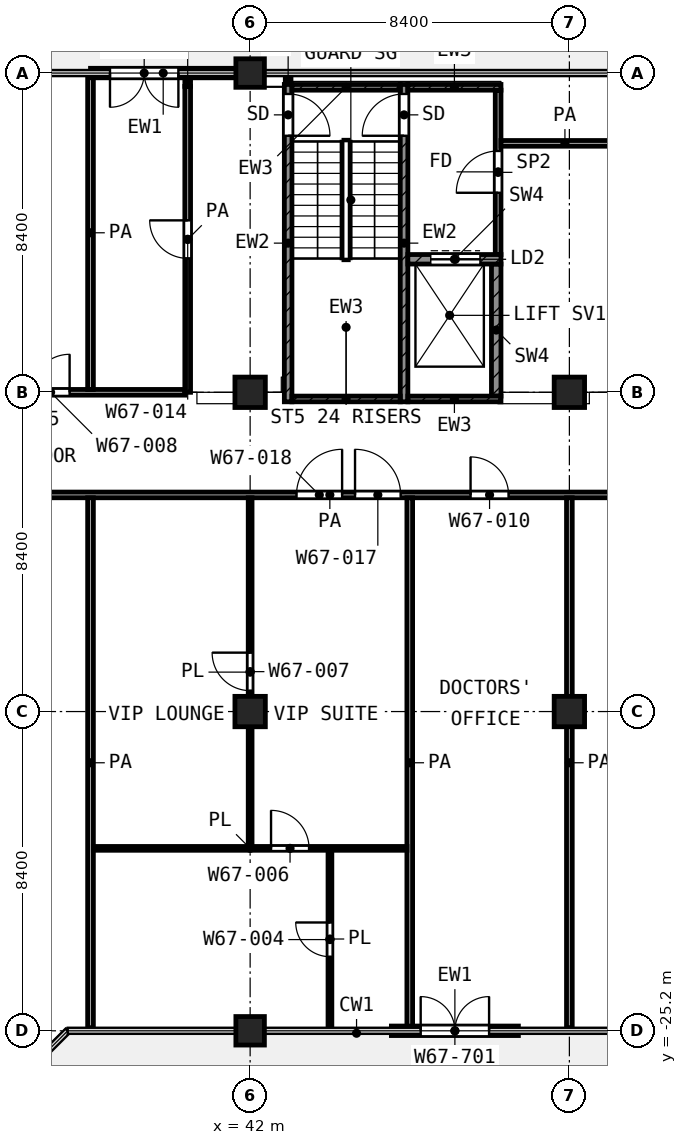
"""IFC4 building model, lengths in metres.
Left out: names, types, materials, properties, quantities, classifications, styles, units other than length and angle.
Written with IfcOpenShell. Run it as: python <this file> out.ifc"""

import sys

from ifc_helpers import new_model, si_unit, direction, frame, frame_2d, origin, origin_2d, place, context, subcontext, project, spatial, rectangle, extrude, element, fill, save


model = new_model("IFC4")
c1 = context("Model", 3, precision=1e-05, world=origin(), true_north=direction((0.0, 1.0)))
c2 = subcontext(c1, "Body", "Model", "MODEL_VIEW")
j1 = project(units=[si_unit("LENGTHUNIT", "METRE"), si_unit("PLANEANGLEUNIT", "RADIAN")], contexts=[c1])
p1 = place(None, origin())
s1 = spatial("IfcSite", under=j1, at=p1, CompositionType="ELEMENT")
p2 = place(p1, origin())
s2 = spatial("IfcBuilding", under=s1, at=p2, CompositionType="ELEMENT")
p3 = place(p2, frame((0.0, 0.0, 290.2)))
s3 = spatial("IfcBuildingStorey", under=s2, at=p3, CompositionType="ELEMENT", Elevation=290.2)
p4 = place(p3, frame((42.0, 0.0, 0.0), z_axis=(0.0, 0.0, 1.0), x_axis=(1.0, 0.0, 0.0)))
e1 = element("IfcColumn", 1, at=p4, inside=s3, PredefinedType="COLUMN", context=c2, shape_type="SweptSolid", body=[
    extrude(rectangle(XDim=0.75, YDim=0.75, at=origin_2d()), origin(), (0.0, 0.0, 1.0), 4.2),
])
for number, where, z_axis, x_axis in (
    (2, (42.0, -8.4, 0.0), (0.0, 0.0, 1.0), (1.0, 0.0, 0.0)),
    (3, (50.4, -8.4, 0.0), (0.0, 0.0, 1.0), (1.0, 0.0, 0.0)),
    (4, (42.0, -16.8, 0.0), (0.0, 0.0, 1.0), (1.0, 0.0, 0.0)),
    (5, (50.4, -16.8, 0.0), (0.0, 0.0, 1.0), (1.0, 0.0, 0.0)),
):
    element("IfcColumn", number, at=place(p3, frame(where, z_axis=z_axis, x_axis=x_axis)), inside=s3, PredefinedType="COLUMN", context=c2, shape_type="SweptSolid", body=[
        extrude(rectangle(XDim=0.8, YDim=0.8, at=origin_2d()), origin(), (0.0, 0.0, 1.0), 4.2),
    ])
p5 = place(p3, frame((42.0, -25.2, 0.0), z_axis=(0.0, 0.0, 1.0), x_axis=(1.0, 0.0, 0.0)))
e6 = element("IfcColumn", 6, at=p5, inside=s3, PredefinedType="COLUMN", context=c2, shape_type="SweptSolid", body=[
    extrude(rectangle(XDim=0.75, YDim=0.75, at=origin_2d()), origin(), (0.0, 0.0, 1.0), 4.2),
])
p6 = place(p3, frame((45.717, -25.2, 0.0), z_axis=(0.0, 0.0, 1.0), x_axis=(1.0, 0.0, 0.0)))
e7 = element("IfcWall", 7, at=p6, inside=s3, PredefinedType="SOLIDWALL", context=c2, shape_type="SweptSolid", body=[
    extrude(rectangle(XDim=3.342, YDim=0.25, at=frame_2d((1.671, 0.0))), origin(), (0.0, 0.0, 1.0), 3.48),
])
p7 = place(p6, frame((0.771, 0.0, 0.0)))
e8 = element("IfcOpeningElement", 8, at=p7, cuts=e7, PredefinedType="OPENING", context=c2, shape_type="SweptSolid", body=[
    extrude(rectangle(XDim=1.8, YDim=2.1, at=frame_2d((0.9, 1.05))), frame((0.0, 0.135, 0.0), z_axis=(0.0, -1.0, 0.0), x_axis=(1.0, 0.0, 0.0)), (0.0, 0.0, 1.0), 0.27),
])
p8 = place(p3, frame((41.625, 0.0, 0.0), z_axis=(0.0, 0.0, 1.0), x_axis=(-1.0, 0.0, 0.0)))
e9 = element("IfcWall", 9, at=p8, inside=s3, PredefinedType="SOLIDWALL", context=c2, shape_type="SweptSolid", body=[
    extrude(rectangle(XDim=3.825, YDim=0.25, at=frame_2d((1.913, 0.0))), origin(), (0.0, 0.0, 1.0), 3.48),
])
p9 = place(p8, frame((1.512, 0.0, 0.0)))
e10 = element("IfcOpeningElement", 10, at=p9, cuts=e9, PredefinedType="OPENING", context=c2, shape_type="SweptSolid", body=[
    extrude(rectangle(XDim=1.8, YDim=2.1, at=frame_2d((0.9, 1.05))), frame((0.0, 0.135, 0.0), z_axis=(0.0, -1.0, 0.0), x_axis=(1.0, 0.0, 0.0)), (0.0, 0.0, 1.0), 0.27),
])
p10 = place(p3, frame((43.0, -8.65, 0.0), z_axis=(0.0, 0.0, 1.0), x_axis=(0.0, 1.0, 0.0)))
e11 = element("IfcWall", 11, at=p10, inside=s3, PredefinedType="SHEAR", context=c2, shape_type="SweptSolid", body=[
    extrude(rectangle(XDim=8.35, YDim=0.2, at=frame_2d((4.175, 0.0))), origin(), (0.0, 0.0, 1.0), 3.6),
])
p11 = place(p10, frame((7.0, 0.0, 0.0)))
e12 = element("IfcOpeningElement", 12, at=p11, cuts=e11, PredefinedType="OPENING", context=c2, shape_type="SweptSolid", body=[
    extrude(rectangle(XDim=1.1, YDim=2.1, at=frame_2d((0.55, 1.05))), frame((0.0, 0.11, 0.0), z_axis=(0.0, -1.0, 0.0), x_axis=(1.0, 0.0, 0.0)), (0.0, 0.0, 1.0), 0.22),
])
p12 = place(p3, frame((46.05, -8.65, 0.0), z_axis=(0.0, 0.0, 1.0), x_axis=(0.0, 1.0, 0.0)))
e13 = element("IfcWall", 13, at=p12, inside=s3, PredefinedType="SHEAR", context=c2, shape_type="SweptSolid", body=[
    extrude(rectangle(XDim=8.35, YDim=0.2, at=frame_2d((4.175, 0.0))), origin(), (0.0, 0.0, 1.0), 3.6),
])
p13 = place(p12, frame((7.0, 0.0, 0.0)))
e14 = element("IfcOpeningElement", 14, at=p13, cuts=e13, PredefinedType="OPENING", context=c2, shape_type="SweptSolid", body=[
    extrude(rectangle(XDim=1.1, YDim=2.1, at=frame_2d((0.55, 1.05))), frame((0.0, 0.11, 0.0), z_axis=(0.0, -1.0, 0.0), x_axis=(1.0, 0.0, 0.0)), (0.0, 0.0, 1.0), 0.22),
])
p14 = place(p3, frame((43.1, -0.375, 0.0), z_axis=(0.0, 0.0, 1.0), x_axis=(1.0, 0.0, 0.0)))
e15 = element("IfcWall", 15, at=p14, inside=s3, PredefinedType="SHEAR", context=c2, shape_type="SweptSolid", body=[
    extrude(rectangle(XDim=2.85, YDim=0.15, at=frame_2d((1.425, 0.0))), origin(), (0.0, 0.0, 1.0), 3.6),
])
p15 = place(p3, frame((46.15, -0.375, 0.0), z_axis=(0.0, 0.0, 1.0), x_axis=(1.0, 0.0, 0.0)))
e16 = element("IfcWall", 16, at=p15, inside=s3, PredefinedType="SHEAR", context=c2, shape_type="SweptSolid", body=[
    extrude(rectangle(XDim=2.45, YDim=0.15, at=frame_2d((1.225, 0.0))), origin(), (0.0, 0.0, 1.0), 3.6),
])
p16 = place(p3, frame((43.1, -8.575, 0.0), z_axis=(0.0, 0.0, 1.0), x_axis=(1.0, 0.0, 0.0)))
e17 = element("IfcWall", 17, at=p16, inside=s3, PredefinedType="SHEAR", context=c2, shape_type="SweptSolid", body=[
    extrude(rectangle(XDim=2.85, YDim=0.15, at=frame_2d((1.425, 0.0))), origin(), (0.0, 0.0, 1.0), 3.6),
])
p17 = place(p3, frame((46.15, -8.575, 0.0), z_axis=(0.0, 0.0, 1.0), x_axis=(1.0, 0.0, 0.0)))
e18 = element("IfcWall", 18, at=p17, inside=s3, PredefinedType="SHEAR", context=c2, shape_type="SweptSolid", body=[
    extrude(rectangle(XDim=2.45, YDim=0.15, at=frame_2d((1.225, 0.0))), origin(), (0.0, 0.0, 1.0), 3.6),
])
p18 = place(p3, frame((46.15, -4.9, 0.0), z_axis=(0.0, 0.0, 1.0), x_axis=(1.0, 0.0, 0.0)))
e19 = element("IfcWall", 19, at=p18, inside=s3, PredefinedType="SHEAR", context=c2, shape_type="SweptSolid", body=[
    extrude(rectangle(XDim=2.45, YDim=0.25, at=frame_2d((1.225, 0.0))), origin(), (0.0, 0.0, 1.0), 3.6),
])
p19 = place(p18, frame((0.6, 0.0, 0.0)))
e20 = element("IfcOpeningElement", 20, at=p19, cuts=e19, PredefinedType="OPENING", context=c2, shape_type="SweptSolid", body=[
    extrude(rectangle(XDim=1.3, YDim=2.1, at=frame_2d((0.65, 1.05))), frame((0.0, 0.135, 0.0), z_axis=(0.0, -1.0, 0.0), x_axis=(1.0, 0.0, 0.0)), (0.0, 0.0, 1.0), 0.27),
])
p20 = place(p3, frame((48.475, -8.5, 0.0), z_axis=(0.0, 0.0, 1.0), x_axis=(0.0, 1.0, 0.0)))
e21 = element("IfcWall", 21, at=p20, inside=s3, PredefinedType="SHEAR", context=c2, shape_type="SweptSolid", body=[
    extrude(rectangle(XDim=3.475, YDim=0.25, at=frame_2d((1.738, 0.0))), origin(), (0.0, 0.0, 1.0), 3.6),
])
p21 = place(p3, frame((48.525, -4.775, 0.0), z_axis=(0.0, 0.0, 1.0), x_axis=(0.0, 1.0, 0.0)))
e22 = element("IfcWall", 22, at=p21, inside=s3, PredefinedType="PARTITIONING", context=c2, shape_type="SweptSolid", body=[
    extrude(rectangle(XDim=4.325, YDim=0.15, at=frame_2d((2.163, 0.0))), origin(), (0.0, 0.0, 1.0), 3.6),
])
p22 = place(p21, frame((1.625, 0.0, 0.0)))
e23 = element("IfcOpeningElement", 23, at=p22, cuts=e22, PredefinedType="OPENING", context=c2, shape_type="SweptSolid", body=[
    extrude(rectangle(XDim=1.1, YDim=2.1, at=frame_2d((0.55, 1.05))), frame((0.0, 0.085, 0.0), z_axis=(0.0, -1.0, 0.0), x_axis=(1.0, 0.0, 0.0)), (0.0, 0.0, 1.0), 0.17),
])
p23 = place(p3, frame((37.875, -20.4, 0.0), z_axis=(0.0, 0.0, 1.0), x_axis=(1.0, 0.0, 0.0)))
e24 = element("IfcWall", 24, at=p23, inside=s3, PredefinedType="PARTITIONING", context=c2, shape_type="SweptSolid", body=[
    extrude(rectangle(XDim=8.25, YDim=0.1, at=frame_2d((4.125, 0.0))), origin(), (0.0, 0.0, 1.0), 3.6),
])
p24 = place(p23, frame((4.675, 0.0, 0.0)))
e25 = element("IfcOpeningElement", 25, at=p24, cuts=e24, PredefinedType="OPENING", context=c2, shape_type="SweptSolid", body=[
    extrude(rectangle(XDim=1.0, YDim=2.1, at=frame_2d((0.5, 1.05))), frame((0.0, 0.06, 0.0), z_axis=(0.0, -1.0, 0.0), x_axis=(1.0, 0.0, 0.0)), (0.0, 0.0, 1.0), 0.12),
])
p25 = place(p3, frame((42.0, -20.35, 0.0), z_axis=(0.0, 0.0, 1.0), x_axis=(0.0, 1.0, 0.0)))
e26 = element("IfcWall", 26, at=p25, inside=s3, PredefinedType="PARTITIONING", context=c2, shape_type="SweptSolid", body=[
    extrude(rectangle(XDim=9.175, YDim=0.1, at=frame_2d((4.587, 0.0))), origin(), (0.0, 0.0, 1.0), 3.6),
])
p26 = place(p25, frame((4.1, 0.0, 0.0)))
e27 = element("IfcOpeningElement", 27, at=p26, cuts=e26, PredefinedType="OPENING", context=c2, shape_type="SweptSolid", body=[
    extrude(rectangle(XDim=1.0, YDim=2.1, at=frame_2d((0.5, 1.05))), frame((0.0, 0.06, 0.0), z_axis=(0.0, -1.0, 0.0), x_axis=(1.0, 0.0, 0.0)), (0.0, 0.0, 1.0), 0.12),
])
p27 = place(p3, frame((44.1, -25.12, 0.0), z_axis=(0.0, 0.0, 1.0), x_axis=(0.0, 1.0, 0.0)))
e28 = element("IfcWall", 28, at=p27, inside=s3, PredefinedType="PARTITIONING", context=c2, shape_type="SweptSolid", body=[
    extrude(rectangle(XDim=4.67, YDim=0.1, at=frame_2d((2.335, 0.0))), origin(), (0.0, 0.0, 1.0), 3.6),
])
p28 = place(p27, frame((1.87, 0.0, 0.0)))
e29 = element("IfcOpeningElement", 29, at=p28, cuts=e28, PredefinedType="OPENING", context=c2, shape_type="SweptSolid", body=[
    extrude(rectangle(XDim=0.9, YDim=2.1, at=frame_2d((0.45, 1.05))), frame((0.0, 0.06, 0.0), z_axis=(0.0, -1.0, 0.0), x_axis=(1.0, 0.0, 0.0)), (0.0, 0.0, 1.0), 0.12),
])
p29 = place(p3, frame((29.475, -11.1, 0.0), z_axis=(0.0, 0.0, 1.0), x_axis=(1.0, 0.0, 0.0)))
e30 = element("IfcWall", 30, at=p29, inside=s3, PredefinedType="PARTITIONING", context=c2, shape_type="SweptSolid", body=[
    extrude(rectangle(XDim=29.245, YDim=0.15, at=frame_2d((14.623, 0.0))), origin(), (0.0, 0.0, 1.0), 3.6),
])
p30 = place(p29, frame((3.525, 0.0, 0.0)))
e31 = element("IfcOpeningElement", 31, at=p30, cuts=e30, PredefinedType="OPENING", context=c2, shape_type="SweptSolid", body=[
    extrude(rectangle(XDim=1.2, YDim=2.1, at=frame_2d((0.6, 1.05))), frame((0.0, 0.085, 0.0), z_axis=(0.0, -1.0, 0.0), x_axis=(1.0, 0.0, 0.0)), (0.0, 0.0, 1.0), 0.17),
])
p31 = place(p29, frame((15.285, 0.0, 0.0)))
e32 = element("IfcOpeningElement", 32, at=p31, cuts=e30, PredefinedType="OPENING", context=c2, shape_type="SweptSolid", body=[
    extrude(rectangle(XDim=1.2, YDim=2.1, at=frame_2d((0.6, 1.05))), frame((0.0, 0.085, 0.0), z_axis=(0.0, -1.0, 0.0), x_axis=(1.0, 0.0, 0.0)), (0.0, 0.0, 1.0), 0.17),
])
p32 = place(p29, frame((13.745, 0.0, 0.0)))
e33 = element("IfcOpeningElement", 33, at=p32, cuts=e30, PredefinedType="OPENING", context=c2, shape_type="SweptSolid", body=[
    extrude(rectangle(XDim=1.2, YDim=2.1, at=frame_2d((0.6, 1.05))), frame((0.0, 0.085, 0.0), z_axis=(0.0, -1.0, 0.0), x_axis=(1.0, 0.0, 0.0)), (0.0, 0.0, 1.0), 0.17),
])
p33 = place(p29, frame((18.325, 0.0, 0.0)))
e34 = element("IfcOpeningElement", 34, at=p33, cuts=e30, PredefinedType="OPENING", context=c2, shape_type="SweptSolid", body=[
    extrude(rectangle(XDim=1.0, YDim=2.1, at=frame_2d((0.5, 1.05))), frame((0.0, 0.085, 0.0), z_axis=(0.0, -1.0, 0.0), x_axis=(1.0, 0.0, 0.0)), (0.0, 0.0, 1.0), 0.17),
])
p34 = place(p29, frame((24.375, 0.0, 0.0)))
e35 = element("IfcOpeningElement", 35, at=p34, cuts=e30, PredefinedType="OPENING", context=c2, shape_type="SweptSolid", body=[
    extrude(rectangle(XDim=1.5, YDim=2.1, at=frame_2d((0.75, 1.05))), frame((0.0, 0.085, 0.0), z_axis=(0.0, -1.0, 0.0), x_axis=(1.0, 0.0, 0.0)), (0.0, 0.0, 1.0), 0.17),
])
p35 = place(p3, frame((24.7, -8.4, 0.0), z_axis=(0.0, 0.0, 1.0), x_axis=(1.0, 0.0, 0.0)))
e36 = element("IfcWall", 36, at=p35, inside=s3, PredefinedType="PARTITIONING", context=c2, shape_type="SweptSolid", body=[
    extrude(rectangle(XDim=15.582, YDim=0.15, at=frame_2d((7.791, 0.0))), origin(), (0.0, 0.0, 1.0), 3.6),
])
p36 = place(p35, frame((2.25, 0.0, 0.0)))
e37 = element("IfcOpeningElement", 37, at=p36, cuts=e36, PredefinedType="OPENING", context=c2, shape_type="SweptSolid", body=[
    extrude(rectangle(XDim=1.0, YDim=2.1, at=frame_2d((0.5, 1.05))), frame((0.0, 0.085, 0.0), z_axis=(0.0, -1.0, 0.0), x_axis=(1.0, 0.0, 0.0)), (0.0, 0.0, 1.0), 0.17),
])
p37 = place(p35, frame((6.55, 0.0, 0.0)))
e38 = element("IfcOpeningElement", 38, at=p37, cuts=e36, PredefinedType="OPENING", context=c2, shape_type="SweptSolid", body=[
    extrude(rectangle(XDim=1.2, YDim=2.1, at=frame_2d((0.6, 1.05))), frame((0.0, 0.085, 0.0), z_axis=(0.0, -1.0, 0.0), x_axis=(1.0, 0.0, 0.0)), (0.0, 0.0, 1.0), 0.17),
])
p38 = place(p35, frame((9.7, 0.0, 0.0)))
e39 = element("IfcOpeningElement", 39, at=p38, cuts=e36, PredefinedType="OPENING", context=c2, shape_type="SweptSolid", body=[
    extrude(rectangle(XDim=0.9, YDim=2.1, at=frame_2d((0.45, 1.05))), frame((0.0, 0.085, 0.0), z_axis=(0.0, -1.0, 0.0), x_axis=(1.0, 0.0, 0.0)), (0.0, 0.0, 1.0), 0.17),
])
p39 = place(p35, frame((11.55, 0.0, 0.0)))
e40 = element("IfcOpeningElement", 40, at=p39, cuts=e36, PredefinedType="OPENING", context=c2, shape_type="SweptSolid", body=[
    extrude(rectangle(XDim=1.0, YDim=2.1, at=frame_2d((0.5, 1.05))), frame((0.0, 0.085, 0.0), z_axis=(0.0, -1.0, 0.0), x_axis=(1.0, 0.0, 0.0)), (0.0, 0.0, 1.0), 0.17),
])
p40 = place(p3, frame((48.6, -1.85, 0.0), z_axis=(0.0, 0.0, 1.0), x_axis=(1.0, 0.0, 0.0)))
e41 = element("IfcWall", 41, at=p40, inside=s3, PredefinedType="PARTITIONING", context=c2, shape_type="SweptSolid", body=[
    extrude(rectangle(XDim=3.366, YDim=0.15, at=frame_2d((1.683, 0.0))), origin(), (0.0, 0.0, 1.0), 3.6),
])
p41 = place(p3, frame((37.8, -25.12, 0.0), z_axis=(0.0, 0.0, 1.0), x_axis=(0.0, 1.0, 0.0)))
e42 = element("IfcWall", 42, at=p41, inside=s3, PredefinedType="PARTITIONING", context=c2, shape_type="SweptSolid", body=[
    extrude(rectangle(XDim=13.945, YDim=0.15, at=frame_2d((6.973, 0.0))), origin(), (0.0, 0.0, 1.0), 3.6),
])
p42 = place(p3, frame((37.8, -8.325, 0.0), z_axis=(0.0, 0.0, 1.0), x_axis=(0.0, 1.0, 0.0)))
e43 = element("IfcWall", 43, at=p42, inside=s3, PredefinedType="PARTITIONING", context=c2, shape_type="SweptSolid", body=[
    extrude(rectangle(XDim=8.245, YDim=0.15, at=frame_2d((4.123, 0.0))), origin(), (0.0, 0.0, 1.0), 3.6),
])
p43 = place(p3, frame((40.357, -8.4, 0.0), z_axis=(0.0, 0.0, 1.0), x_axis=(0.0, 1.0, 0.0)))
e44 = element("IfcWall", 44, at=p43, inside=s3, PredefinedType="PARTITIONING", context=c2, shape_type="SweptSolid", body=[
    extrude(rectangle(XDim=8.048, YDim=0.15, at=frame_2d((4.024, 0.0))), origin(), (0.0, 0.0, 1.0), 3.6),
])
p44 = place(p43, frame((3.524, 0.0, 0.0)))
e45 = element("IfcOpeningElement", 45, at=p44, cuts=e44, PredefinedType="OPENING", context=c2, shape_type="SweptSolid", body=[
    extrude(rectangle(XDim=1.0, YDim=2.1, at=frame_2d((0.5, 1.05))), frame((0.0, 0.085, 0.0), z_axis=(0.0, -1.0, 0.0), x_axis=(1.0, 0.0, 0.0)), (0.0, 0.0, 1.0), 0.17),
])
p45 = place(p3, frame((40.357, -0.35, 0.0), z_axis=(0.0, 0.0, 1.0), x_axis=(0.0, 1.0, 0.0)))
e46 = element("IfcWall", 46, at=p45, inside=s3, PredefinedType="PARTITIONING", context=c2, shape_type="SweptSolid", body=[
    extrude(rectangle(XDim=0.27, YDim=0.15, at=frame_2d((0.135, 0.0))), origin(), (0.0, 0.0, 1.0), 3.6),
])
p46 = place(p3, frame((43.0, -0.27, 0.0), z_axis=(0.0, 0.0, 1.0), x_axis=(0.0, 1.0, 0.0)))
e47 = element("IfcWall", 47, at=p46, inside=s3, PredefinedType="PARTITIONING", context=c2, shape_type="SweptSolid", body=[
    extrude(rectangle(XDim=0.19, YDim=0.15, at=frame_2d((0.095, 0.0))), origin(), (0.0, 0.0, 1.0), 3.6),
])
for number, where, z_axis, x_axis in (
    (48, (46.2, -25.12, 0.0), (0.0, 0.0, 1.0), (0.0, 1.0, 0.0)),
    (49, (50.4, -25.12, 0.0), (0.0, 0.0, 1.0), (0.0, 1.0, 0.0)),
):
    element("IfcWall", number, at=place(p3, frame(where, z_axis=z_axis, x_axis=x_axis)), inside=s3, PredefinedType="PARTITIONING", context=c2, shape_type="SweptSolid", body=[
        extrude(rectangle(XDim=13.945, YDim=0.15, at=frame_2d((6.973, 0.0))), origin(), (0.0, 0.0, 1.0), 3.6),
    ])
p47 = place(p7, origin())
e50 = element("IfcDoor", 50, at=p47, inside=s3, OperationType="DOUBLE_DOOR_SINGLE_SWING", PredefinedType="DOOR", context=c2, shape_type="SweptSolid", body=[
    extrude(rectangle(XDim=1.8, YDim=2.1, at=frame_2d((0.9, 1.05))), frame((0.0, 0.025, 0.0), z_axis=(0.0, -1.0, 0.0), x_axis=(1.0, 0.0, 0.0)), (0.0, 0.0, 1.0), 0.05),
])
fill(e8, e50)
p48 = place(p9, origin())
e51 = element("IfcDoor", 51, at=p48, inside=s3, OperationType="DOUBLE_DOOR_SINGLE_SWING", PredefinedType="DOOR", context=c2, shape_type="SweptSolid", body=[
    extrude(rectangle(XDim=1.8, YDim=2.1, at=frame_2d((0.9, 1.05))), frame((0.0, 0.025, 0.0), z_axis=(0.0, -1.0, 0.0), x_axis=(1.0, 0.0, 0.0)), (0.0, 0.0, 1.0), 0.05),
])
fill(e10, e51)
p49 = place(p11, frame((1.1, 0.0, 0.0), z_axis=(0.0, 0.0, 1.0), x_axis=(-1.0, 0.0, 0.0)))
e52 = element("IfcDoor", 52, at=p49, inside=s3, OperationType="SINGLE_SWING_LEFT", PredefinedType="DOOR", context=c2, shape_type="SweptSolid", body=[
    extrude(rectangle(XDim=1.1, YDim=2.1, at=frame_2d((0.55, 1.05))), frame((0.0, 0.025, 0.0), z_axis=(0.0, -1.0, 0.0), x_axis=(1.0, 0.0, 0.0)), (0.0, 0.0, 1.0), 0.05),
])
fill(e12, e52)
p50 = place(p13, origin())
e53 = element("IfcDoor", 53, at=p50, inside=s3, OperationType="SINGLE_SWING_LEFT", PredefinedType="DOOR", context=c2, shape_type="SweptSolid", body=[
    extrude(rectangle(XDim=1.1, YDim=2.1, at=frame_2d((0.55, 1.05))), frame((0.0, 0.025, 0.0), z_axis=(0.0, -1.0, 0.0), x_axis=(1.0, 0.0, 0.0)), (0.0, 0.0, 1.0), 0.05),
])
fill(e14, e53)
p51 = place(p19, origin())
e54 = element("IfcDoor", 54, at=p51, inside=s3, OperationType="DOUBLE_DOOR_SLIDING", PredefinedType="DOOR", context=c2, shape_type="SweptSolid", body=[
    extrude(rectangle(XDim=1.3, YDim=2.1, at=frame_2d((0.65, 1.05))), frame((0.0, 0.025, 0.0), z_axis=(0.0, -1.0, 0.0), x_axis=(1.0, 0.0, 0.0)), (0.0, 0.0, 1.0), 0.05),
])
fill(e20, e54)
p52 = place(p22, origin())
e55 = element("IfcDoor", 55, at=p52, inside=s3, OperationType="SINGLE_SWING_LEFT", PredefinedType="DOOR", context=c2, shape_type="SweptSolid", body=[
    extrude(rectangle(XDim=1.1, YDim=2.1, at=frame_2d((0.55, 1.05))), frame((0.0, 0.025, 0.0), z_axis=(0.0, -1.0, 0.0), x_axis=(1.0, 0.0, 0.0)), (0.0, 0.0, 1.0), 0.05),
])
fill(e23, e55)
p53 = place(p31, origin())
e56 = element("IfcDoor", 56, at=p53, inside=s3, OperationType="SINGLE_SWING_LEFT", PredefinedType="DOOR", context=c2, shape_type="SweptSolid", body=[
    extrude(rectangle(XDim=1.2, YDim=2.1, at=frame_2d((0.6, 1.05))), frame((0.0, 0.025, 0.0), z_axis=(0.0, -1.0, 0.0), x_axis=(1.0, 0.0, 0.0)), (0.0, 0.0, 1.0), 0.05),
])
fill(e32, e56)
p54 = place(p32, origin())
e57 = element("IfcDoor", 57, at=p54, inside=s3, OperationType="SINGLE_SWING_RIGHT", PredefinedType="DOOR", context=c2, shape_type="SweptSolid", body=[
    extrude(rectangle(XDim=1.2, YDim=2.1, at=frame_2d((0.6, 1.05))), frame((0.0, 0.025, 0.0), z_axis=(0.0, -1.0, 0.0), x_axis=(1.0, 0.0, 0.0)), (0.0, 0.0, 1.0), 0.05),
])
fill(e33, e57)
p55 = place(p24, origin())
e58 = element("IfcDoor", 58, at=p55, inside=s3, OperationType="SINGLE_SWING_LEFT", PredefinedType="DOOR", context=c2, shape_type="SweptSolid", body=[
    extrude(rectangle(XDim=1.0, YDim=2.1, at=frame_2d((0.5, 1.05))), frame((0.0, 0.025, 0.0), z_axis=(0.0, -1.0, 0.0), x_axis=(1.0, 0.0, 0.0)), (0.0, 0.0, 1.0), 0.05),
])
fill(e25, e58)
p56 = place(p26, origin())
e59 = element("IfcDoor", 59, at=p56, inside=s3, OperationType="SINGLE_SWING_RIGHT", PredefinedType="DOOR", context=c2, shape_type="SweptSolid", body=[
    extrude(rectangle(XDim=1.0, YDim=2.1, at=frame_2d((0.5, 1.05))), frame((0.0, 0.025, 0.0), z_axis=(0.0, -1.0, 0.0), x_axis=(1.0, 0.0, 0.0)), (0.0, 0.0, 1.0), 0.05),
])
fill(e27, e59)
p57 = place(p28, origin())
e60 = element("IfcDoor", 60, at=p57, inside=s3, OperationType="SINGLE_SWING_RIGHT", PredefinedType="DOOR", context=c2, shape_type="SweptSolid", body=[
    extrude(rectangle(XDim=0.9, YDim=2.1, at=frame_2d((0.45, 1.05))), frame((0.0, 0.025, 0.0), z_axis=(0.0, -1.0, 0.0), x_axis=(1.0, 0.0, 0.0)), (0.0, 0.0, 1.0), 0.05),
])
fill(e29, e60)
p58 = place(p33, origin())
e61 = element("IfcDoor", 61, at=p58, inside=s3, OperationType="SINGLE_SWING_LEFT", PredefinedType="DOOR", context=c2, shape_type="SweptSolid", body=[
    extrude(rectangle(XDim=1.0, YDim=2.1, at=frame_2d((0.5, 1.05))), frame((0.0, 0.025, 0.0), z_axis=(0.0, -1.0, 0.0), x_axis=(1.0, 0.0, 0.0)), (0.0, 0.0, 1.0), 0.05),
])
fill(e34, e61)
p59 = place(p39, origin())
e62 = element("IfcDoor", 62, at=p59, inside=s3, OperationType="SINGLE_SWING_RIGHT", PredefinedType="DOOR", context=c2, shape_type="SweptSolid", body=[
    extrude(rectangle(XDim=1.0, YDim=2.1, at=frame_2d((0.5, 1.05))), frame((0.0, 0.025, 0.0), z_axis=(0.0, -1.0, 0.0), x_axis=(1.0, 0.0, 0.0)), (0.0, 0.0, 1.0), 0.05),
])
fill(e40, e62)
p60 = place(p44, origin())
e63 = element("IfcDoor", 63, at=p60, inside=s3, OperationType="SINGLE_SWING_RIGHT", PredefinedType="DOOR", context=c2, shape_type="SweptSolid", body=[
    extrude(rectangle(XDim=1.0, YDim=2.1, at=frame_2d((0.5, 1.05))), frame((0.0, 0.025, 0.0), z_axis=(0.0, -1.0, 0.0), x_axis=(1.0, 0.0, 0.0)), (0.0, 0.0, 1.0), 0.05),
])
fill(e45, e63)
save(model, sys.argv[1])
